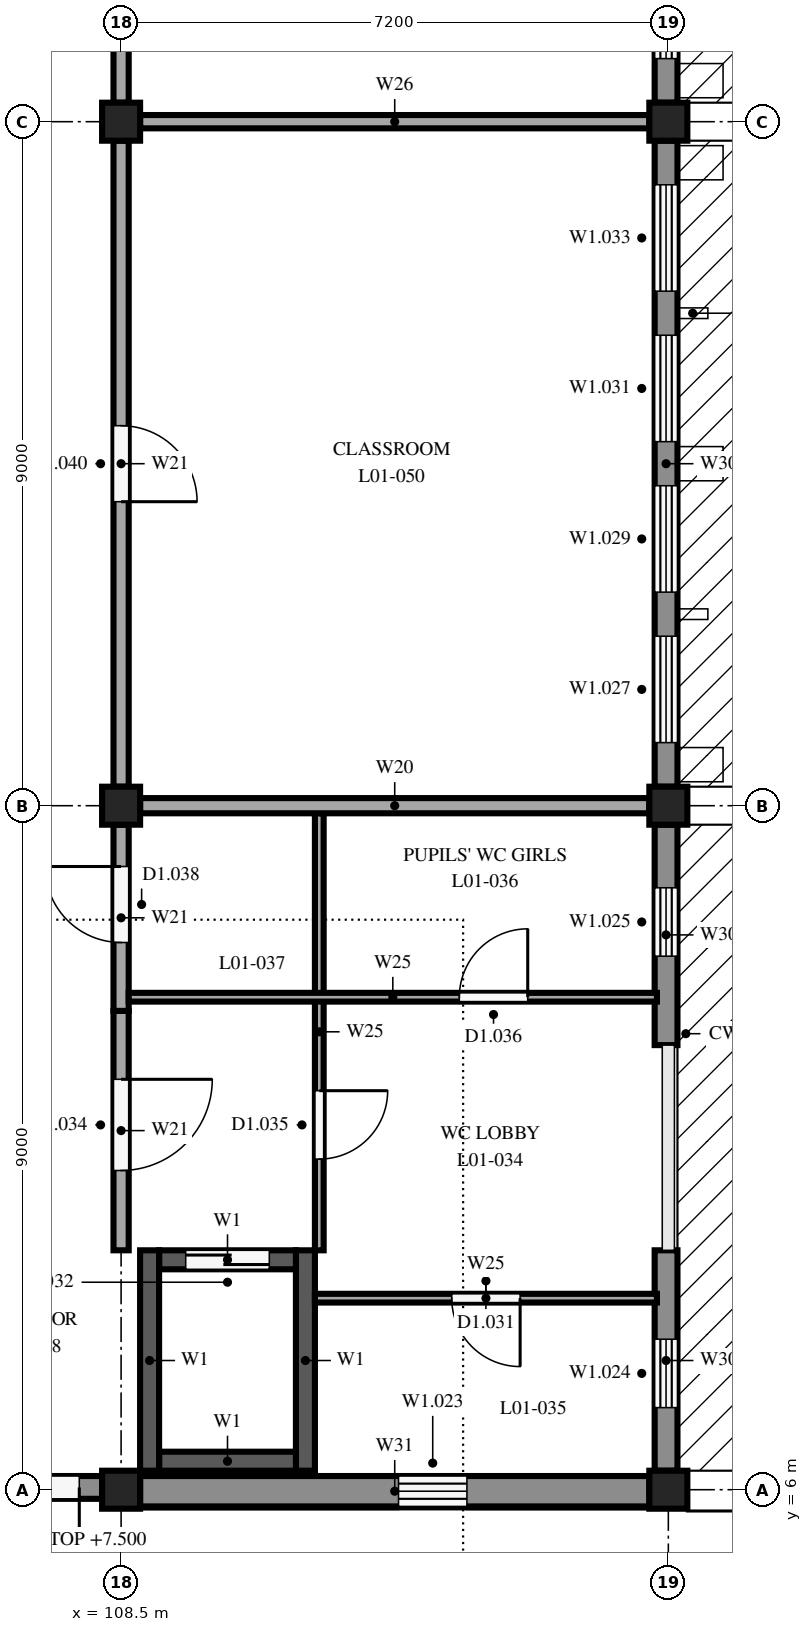
"""IFC4 building model, lengths in metres.
Left out: names, types, materials, properties, quantities, classifications, styles, units other than length and angle.
Written with IfcOpenShell. Run it as: python <this file> out.ifc"""

import sys

from ifc_helpers import new_model, si_unit, direction, frame, frame_2d, origin, origin_2d, place, context, subcontext, project, spatial, rectangle, extrude, element, fill, save


model = new_model("IFC4")
c1 = context("Model", 3, precision=1e-05, world=origin(), true_north=direction((0.0, 1.0)))
c2 = subcontext(c1, "Body", "Model", "MODEL_VIEW")
j1 = project(units=[si_unit("LENGTHUNIT", "METRE"), si_unit("PLANEANGLEUNIT", "RADIAN")], contexts=[c1])
p1 = place(None, origin())
s1 = spatial("IfcSite", under=j1, at=p1, CompositionType="ELEMENT")
p2 = place(p1, origin())
s2 = spatial("IfcBuilding", under=s1, at=p2, CompositionType="ELEMENT")
p3 = place(p2, frame((0.0, 0.0, 4.5)))
s3 = spatial("IfcBuildingStorey", under=s2, at=p3, CompositionType="ELEMENT", Elevation=4.5)
for number, where, z_axis, x_axis in (
    (1, (108.5, 6.0, 0.0), (0.0, 0.0, 1.0), (1.0, 0.0, 0.0)),
    (2, (108.5, 15.0, 0.0), (0.0, 0.0, 1.0), (1.0, 0.0, 0.0)),
    (3, (108.5, 24.0, 0.0), (0.0, 0.0, 1.0), (1.0, 0.0, 0.0)),
    (4, (115.7, 6.0, 0.0), (0.0, 0.0, 1.0), (1.0, 0.0, 0.0)),
    (5, (115.7, 15.0, 0.0), (0.0, 0.0, 1.0), (1.0, 0.0, 0.0)),
    (6, (115.7, 24.0, 0.0), (0.0, 0.0, 1.0), (1.0, 0.0, 0.0)),
):
    element("IfcColumn", number, at=place(p3, frame(where, z_axis=z_axis, x_axis=x_axis)), inside=s3, PredefinedType="COLUMN", context=c2, shape_type="SweptSolid", body=[
        extrude(rectangle(XDim=0.5, YDim=0.5, at=origin_2d()), origin(), (0.0, 0.0, 1.0), 3.35),
    ])
for number, where, z_axis, x_axis in (
    (7, (108.875, 6.25, 0.0), (0.0, 0.0, 1.0), (0.0, 1.0, 0.0)),
    (8, (110.925, 6.25, 0.0), (0.0, 0.0, 1.0), (0.0, 1.0, 0.0)),
):
    element("IfcWall", number, at=place(p3, frame(where, z_axis=z_axis, x_axis=x_axis)), inside=s3, PredefinedType="SHEAR", context=c2, shape_type="SweptSolid", body=[
        extrude(rectangle(XDim=2.9, YDim=0.25, at=frame_2d((1.45, 0.0))), origin(), (0.0, 0.0, 1.0), 3.35),
    ])
p4 = place(p3, frame((109.0, 6.375, 0.0), z_axis=(0.0, 0.0, 1.0), x_axis=(1.0, 0.0, 0.0)))
e9 = element("IfcWall", 9, at=p4, inside=s3, PredefinedType="SHEAR", context=c2, shape_type="SweptSolid", body=[
    extrude(rectangle(XDim=1.8, YDim=0.25, at=frame_2d((0.9, 0.0))), origin(), (0.0, 0.0, 1.0), 3.35),
])
p5 = place(p3, frame((109.0, 9.025, 0.0), z_axis=(0.0, 0.0, 1.0), x_axis=(1.0, 0.0, 0.0)))
e10 = element("IfcWall", 10, at=p5, inside=s3, PredefinedType="SHEAR", context=c2, shape_type="SweptSolid", body=[
    extrude(rectangle(XDim=1.8, YDim=0.25, at=frame_2d((0.9, 0.0))), origin(), (0.0, 0.0, 1.0), 3.35),
])
p6 = place(p5, frame((0.35, 0.0, 0.0)))
e11 = element("IfcOpeningElement", 11, at=p6, cuts=e10, PredefinedType="OPENING", context=c2, shape_type="SweptSolid", body=[
    extrude(rectangle(XDim=1.1, YDim=2.1, at=frame_2d((0.55, 1.05))), frame((0.0, 0.135, 0.0), z_axis=(0.0, -1.0, 0.0), x_axis=(1.0, 0.0, 0.0)), (0.0, 0.0, 1.0), 0.27),
])
p7 = place(p3, frame((115.67, 9.15, 0.0), z_axis=(0.0, 0.0, 1.0), x_axis=(0.0, -1.0, 0.0)))
e12 = element("IfcWall", 12, at=p7, inside=s3, PredefinedType="STANDARD", context=c2, shape_type="SweptSolid", body=[
    extrude(rectangle(XDim=2.9, YDim=0.3, at=frame_2d((1.45, 0.0))), origin(), (0.0, 0.0, 1.0), 2.85),
])
p8 = place(p7, frame((1.17, 0.0, 1.6)))
e13 = element("IfcOpeningElement", 13, at=p8, cuts=e12, PredefinedType="OPENING", context=c2, shape_type="SweptSolid", body=[
    extrude(rectangle(XDim=0.9, YDim=1.0, at=frame_2d((0.45, 0.5))), frame((0.0, 0.16, 0.0), z_axis=(0.0, -1.0, 0.0), x_axis=(1.0, 0.0, 0.0)), (0.0, 0.0, 1.0), 0.32),
])
p9 = place(p3, frame((115.67, 14.75, 0.0), z_axis=(0.0, 0.0, 1.0), x_axis=(0.0, -1.0, 0.0)))
e14 = element("IfcWall", 14, at=p9, inside=s3, PredefinedType="STANDARD", context=c2, shape_type="SweptSolid", body=[
    extrude(rectangle(XDim=2.9, YDim=0.3, at=frame_2d((1.45, 0.0))), origin(), (0.0, 0.0, 1.0), 2.85),
])
p10 = place(p9, frame((0.83, 0.0, 1.6)))
e15 = element("IfcOpeningElement", 15, at=p10, cuts=e14, PredefinedType="OPENING", context=c2, shape_type="SweptSolid", body=[
    extrude(rectangle(XDim=0.9, YDim=1.0, at=frame_2d((0.45, 0.5))), frame((0.0, 0.16, 0.0), z_axis=(0.0, -1.0, 0.0), x_axis=(1.0, 0.0, 0.0)), (0.0, 0.0, 1.0), 0.32),
])
p11 = place(p3, frame((115.67, 23.75, 0.0), z_axis=(0.0, 0.0, 1.0), x_axis=(0.0, -1.0, 0.0)))
e16 = element("IfcWall", 16, at=p11, inside=s3, PredefinedType="STANDARD", context=c2, shape_type="SweptSolid", body=[
    extrude(rectangle(XDim=8.5, YDim=0.3, at=frame_2d((4.25, 0.0))), origin(), (0.0, 0.0, 1.0), 2.85),
])
p12 = place(p11, frame((6.52, 0.0, 0.6)))
e17 = element("IfcOpeningElement", 17, at=p12, cuts=e16, PredefinedType="OPENING", context=c2, shape_type="SweptSolid", body=[
    extrude(rectangle(XDim=1.4, YDim=2.2, at=frame_2d((0.7, 1.1))), frame((0.0, 0.16, 0.0), z_axis=(0.0, -1.0, 0.0), x_axis=(1.0, 0.0, 0.0)), (0.0, 0.0, 1.0), 0.32),
])
p13 = place(p11, frame((4.54, 0.0, 0.6)))
e18 = element("IfcOpeningElement", 18, at=p13, cuts=e16, PredefinedType="OPENING", context=c2, shape_type="SweptSolid", body=[
    extrude(rectangle(XDim=1.4, YDim=2.2, at=frame_2d((0.7, 1.1))), frame((0.0, 0.16, 0.0), z_axis=(0.0, -1.0, 0.0), x_axis=(1.0, 0.0, 0.0)), (0.0, 0.0, 1.0), 0.32),
])
p14 = place(p11, frame((2.56, 0.0, 0.6)))
e19 = element("IfcOpeningElement", 19, at=p14, cuts=e16, PredefinedType="OPENING", context=c2, shape_type="SweptSolid", body=[
    extrude(rectangle(XDim=1.4, YDim=2.2, at=frame_2d((0.7, 1.1))), frame((0.0, 0.16, 0.0), z_axis=(0.0, -1.0, 0.0), x_axis=(1.0, 0.0, 0.0)), (0.0, 0.0, 1.0), 0.32),
])
p15 = place(p11, frame((0.58, 0.0, 0.6)))
e20 = element("IfcOpeningElement", 20, at=p15, cuts=e16, PredefinedType="OPENING", context=c2, shape_type="SweptSolid", body=[
    extrude(rectangle(XDim=1.4, YDim=2.2, at=frame_2d((0.7, 1.1))), frame((0.0, 0.16, 0.0), z_axis=(0.0, -1.0, 0.0), x_axis=(1.0, 0.0, 0.0)), (0.0, 0.0, 1.0), 0.32),
])
p16 = place(p3, frame((115.67, 32.75, 0.0), z_axis=(0.0, 0.0, 1.0), x_axis=(0.0, -1.0, 0.0)))
e21 = element("IfcWall", 21, at=p16, inside=s3, PredefinedType="STANDARD", context=c2, shape_type="SweptSolid", body=[
    extrude(rectangle(XDim=8.5, YDim=0.3, at=frame_2d((4.25, 0.0))), origin(), (0.0, 0.0, 1.0), 2.85),
])
p17 = place(p16, frame((6.52, 0.0, 0.6)))
e22 = element("IfcOpeningElement", 22, at=p17, cuts=e21, PredefinedType="OPENING", context=c2, shape_type="SweptSolid", body=[
    extrude(rectangle(XDim=1.4, YDim=2.2, at=frame_2d((0.7, 1.1))), frame((0.0, 0.16, 0.0), z_axis=(0.0, -1.0, 0.0), x_axis=(1.0, 0.0, 0.0)), (0.0, 0.0, 1.0), 0.32),
])
p18 = place(p16, frame((4.54, 0.0, 0.6)))
e23 = element("IfcOpeningElement", 23, at=p18, cuts=e21, PredefinedType="OPENING", context=c2, shape_type="SweptSolid", body=[
    extrude(rectangle(XDim=1.4, YDim=2.2, at=frame_2d((0.7, 1.1))), frame((0.0, 0.16, 0.0), z_axis=(0.0, -1.0, 0.0), x_axis=(1.0, 0.0, 0.0)), (0.0, 0.0, 1.0), 0.32),
])
p19 = place(p16, frame((2.56, 0.0, 0.6)))
e24 = element("IfcOpeningElement", 24, at=p19, cuts=e21, PredefinedType="OPENING", context=c2, shape_type="SweptSolid", body=[
    extrude(rectangle(XDim=1.4, YDim=2.2, at=frame_2d((0.7, 1.1))), frame((0.0, 0.16, 0.0), z_axis=(0.0, -1.0, 0.0), x_axis=(1.0, 0.0, 0.0)), (0.0, 0.0, 1.0), 0.32),
])
p20 = place(p16, frame((0.58, 0.0, 0.6)))
e25 = element("IfcOpeningElement", 25, at=p20, cuts=e21, PredefinedType="OPENING", context=c2, shape_type="SweptSolid", body=[
    extrude(rectangle(XDim=1.4, YDim=2.2, at=frame_2d((0.7, 1.1))), frame((0.0, 0.16, 0.0), z_axis=(0.0, -1.0, 0.0), x_axis=(1.0, 0.0, 0.0)), (0.0, 0.0, 1.0), 0.32),
])
p21 = place(p3, frame((108.25, 6.03, 0.0), z_axis=(0.0, 0.0, 1.0), x_axis=(-1.0, 0.0, 0.0)))
e26 = element("IfcWall", 26, at=p21, inside=s3, PredefinedType="STANDARD", context=c2, shape_type="SweptSolid", body=[
    extrude(rectangle(XDim=2.2, YDim=0.3, at=frame_2d((1.1, 0.0))), origin(), (0.0, 0.0, 1.0), 3.0),
])
p22 = place(p21, frame((0.3, 0.0, 0.0)))
e27 = element("IfcOpeningElement", 27, at=p22, cuts=e26, PredefinedType="OPENING", context=c2, shape_type="SweptSolid", body=[
    extrude(rectangle(XDim=1.6, YDim=2.4, at=frame_2d((0.8, 1.2))), frame((0.0, 0.16, 0.0), z_axis=(0.0, -1.0, 0.0), x_axis=(1.0, 0.0, 0.0)), (0.0, 0.0, 1.0), 0.32),
])
p23 = place(p3, frame((115.45, 5.98, 0.0), z_axis=(0.0, 0.0, 1.0), x_axis=(-1.0, 0.0, 0.0)))
e28 = element("IfcWall", 28, at=p23, inside=s3, PredefinedType="STANDARD", context=c2, shape_type="SweptSolid", body=[
    extrude(rectangle(XDim=6.7, YDim=0.4, at=frame_2d((3.35, 0.0))), origin(), (0.0, 0.0, 1.0), 2.9),
])
p24 = place(p23, frame((2.4, 0.0, 1.6)))
e29 = element("IfcOpeningElement", 29, at=p24, cuts=e28, PredefinedType="OPENING", context=c2, shape_type="SweptSolid", body=[
    extrude(rectangle(XDim=0.9, YDim=1.0, at=frame_2d((0.45, 0.5))), frame((0.0, 0.21, 0.0), z_axis=(0.0, -1.0, 0.0), x_axis=(1.0, 0.0, 0.0)), (0.0, 0.0, 1.0), 0.42),
])
p25 = place(p3, frame((108.5, 12.3, 0.0), z_axis=(0.0, 0.0, 1.0), x_axis=(0.0, -1.0, 0.0)))
e30 = element("IfcWall", 30, at=p25, inside=s3, PredefinedType="PARTITIONING", context=c2, shape_type="SweptSolid", body=[
    extrude(rectangle(XDim=3.15, YDim=0.2, at=frame_2d((1.575, 0.0))), origin(), (0.0, 0.0, 1.0), 2.9),
])
p26 = place(p25, frame((0.9, 0.0, 0.0)))
e31 = element("IfcOpeningElement", 31, at=p26, cuts=e30, PredefinedType="OPENING", context=c2, shape_type="SweptSolid", body=[
    extrude(rectangle(XDim=1.2, YDim=2.1, at=frame_2d((0.6, 1.05))), frame((0.0, 0.11, 0.0), z_axis=(0.0, -1.0, 0.0), x_axis=(1.0, 0.0, 0.0)), (0.0, 0.0, 1.0), 0.22),
])
p27 = place(p3, frame((108.5, 12.3, 0.0), z_axis=(0.0, 0.0, 1.0), x_axis=(0.0, 1.0, 0.0)))
e32 = element("IfcWall", 32, at=p27, inside=s3, PredefinedType="PARTITIONING", context=c2, shape_type="SweptSolid", body=[
    extrude(rectangle(XDim=2.45, YDim=0.2, at=frame_2d((1.225, 0.0))), origin(), (0.0, 0.0, 1.0), 2.9),
])
p28 = place(p27, frame((0.9, 0.0, 0.0)))
e33 = element("IfcOpeningElement", 33, at=p28, cuts=e32, PredefinedType="OPENING", context=c2, shape_type="SweptSolid", body=[
    extrude(rectangle(XDim=1.0, YDim=2.1, at=frame_2d((0.5, 1.05))), frame((0.0, 0.11, 0.0), z_axis=(0.0, -1.0, 0.0), x_axis=(1.0, 0.0, 0.0)), (0.0, 0.0, 1.0), 0.22),
])
p29 = place(p3, frame((108.75, 15.0, 0.0), z_axis=(0.0, 0.0, 1.0), x_axis=(1.0, 0.0, 0.0)))
e34 = element("IfcWall", 34, at=p29, inside=s3, PredefinedType="PARTITIONING", context=c2, shape_type="SweptSolid", body=[
    extrude(rectangle(XDim=6.7, YDim=0.2, at=frame_2d((3.35, 0.0))), origin(), (0.0, 0.0, 1.0), 2.9),
])
p30 = place(p3, frame((111.107, 14.9, 0.0), z_axis=(0.0, 0.0, 1.0), x_axis=(0.0, -1.0, 0.0)))
e35 = element("IfcWall", 35, at=p30, inside=s3, PredefinedType="PARTITIONING", context=c2, shape_type="SweptSolid", body=[
    extrude(rectangle(XDim=5.75, YDim=0.115, at=frame_2d((2.875, 0.0))), origin(), (0.0, 0.0, 1.0), 3.35),
])
p31 = place(p30, frame((3.65, 0.0, 0.0)))
e36 = element("IfcOpeningElement", 36, at=p31, cuts=e35, PredefinedType="OPENING", context=c2, shape_type="SweptSolid", body=[
    extrude(rectangle(XDim=0.9, YDim=2.1, at=frame_2d((0.45, 1.05))), frame((0.0, 0.067, 0.0), z_axis=(0.0, -1.0, 0.0), x_axis=(1.0, 0.0, 0.0)), (0.0, 0.0, 1.0), 0.135),
])
p32 = place(p3, frame((115.55, 8.52, 0.0), z_axis=(0.0, 0.0, 1.0), x_axis=(-1.0, 0.0, 0.0)))
e37 = element("IfcWall", 37, at=p32, inside=s3, PredefinedType="PARTITIONING", context=c2, shape_type="SweptSolid", body=[
    extrude(rectangle(XDim=4.5, YDim=0.115, at=frame_2d((2.25, 0.0))), origin(), (0.0, 0.0, 1.0), 3.35),
])
p33 = place(p32, frame((1.8, 0.0, 0.0)))
e38 = element("IfcOpeningElement", 38, at=p33, cuts=e37, PredefinedType="OPENING", context=c2, shape_type="SweptSolid", body=[
    extrude(rectangle(XDim=0.9, YDim=2.1, at=frame_2d((0.45, 1.05))), frame((0.0, 0.067, 0.0), z_axis=(0.0, -1.0, 0.0), x_axis=(1.0, 0.0, 0.0)), (0.0, 0.0, 1.0), 0.135),
])
p34 = place(p3, frame((108.6, 12.48, 0.0), z_axis=(0.0, 0.0, 1.0), x_axis=(1.0, 0.0, 0.0)))
e39 = element("IfcWall", 39, at=p34, inside=s3, PredefinedType="PARTITIONING", context=c2, shape_type="SweptSolid", body=[
    extrude(rectangle(XDim=6.95, YDim=0.115, at=frame_2d((3.475, 0.0))), origin(), (0.0, 0.0, 1.0), 3.35),
])
p35 = place(p34, frame((4.35, 0.0, 0.0)))
e40 = element("IfcOpeningElement", 40, at=p35, cuts=e39, PredefinedType="OPENING", context=c2, shape_type="SweptSolid", body=[
    extrude(rectangle(XDim=0.9, YDim=2.1, at=frame_2d((0.45, 1.05))), frame((0.0, 0.067, 0.0), z_axis=(0.0, -1.0, 0.0), x_axis=(1.0, 0.0, 0.0)), (0.0, 0.0, 1.0), 0.135),
])
p36 = place(p3, frame((108.5, 23.75, 0.0), z_axis=(0.0, 0.0, 1.0), x_axis=(0.0, -1.0, 0.0)))
e41 = element("IfcWall", 41, at=p36, inside=s3, PredefinedType="PARTITIONING", context=c2, shape_type="SweptSolid", body=[
    extrude(rectangle(XDim=8.5, YDim=0.2, at=frame_2d((4.25, 0.0))), origin(), (0.0, 0.0, 1.0), 2.9),
])
p37 = place(p36, frame((3.75, 0.0, 0.0)))
e42 = element("IfcOpeningElement", 42, at=p37, cuts=e41, PredefinedType="OPENING", context=c2, shape_type="SweptSolid", body=[
    extrude(rectangle(XDim=1.0, YDim=2.1, at=frame_2d((0.5, 1.05))), frame((0.0, 0.11, 0.0), z_axis=(0.0, -1.0, 0.0), x_axis=(1.0, 0.0, 0.0)), (0.0, 0.0, 1.0), 0.22),
])
p38 = place(p3, frame((108.5, 32.75, 0.0), z_axis=(0.0, 0.0, 1.0), x_axis=(0.0, -1.0, 0.0)))
e43 = element("IfcWall", 43, at=p38, inside=s3, PredefinedType="PARTITIONING", context=c2, shape_type="SweptSolid", body=[
    extrude(rectangle(XDim=8.5, YDim=0.2, at=frame_2d((4.25, 0.0))), origin(), (0.0, 0.0, 1.0), 2.9),
])
p39 = place(p38, frame((5.919, 0.0, 0.0)))
e44 = element("IfcOpeningElement", 44, at=p39, cuts=e43, PredefinedType="OPENING", context=c2, shape_type="SweptSolid", body=[
    extrude(rectangle(XDim=1.0, YDim=2.1, at=frame_2d((0.5, 1.05))), frame((0.0, 0.11, 0.0), z_axis=(0.0, -1.0, 0.0), x_axis=(1.0, 0.0, 0.0)), (0.0, 0.0, 1.0), 0.22),
])
p40 = place(p38, frame((1.581, 0.0, 0.0)))
e45 = element("IfcOpeningElement", 45, at=p40, cuts=e43, PredefinedType="OPENING", context=c2, shape_type="SweptSolid", body=[
    extrude(rectangle(XDim=1.0, YDim=2.1, at=frame_2d((0.5, 1.05))), frame((0.0, 0.11, 0.0), z_axis=(0.0, -1.0, 0.0), x_axis=(1.0, 0.0, 0.0)), (0.0, 0.0, 1.0), 0.22),
])
p41 = place(p3, frame((108.75, 24.0, 0.0), z_axis=(0.0, 0.0, 1.0), x_axis=(1.0, 0.0, 0.0)))
e46 = element("IfcWall", 46, at=p41, inside=s3, PredefinedType="PARTITIONING", context=c2, shape_type="SweptSolid", body=[
    extrude(rectangle(XDim=6.7, YDim=0.175, at=frame_2d((3.35, 0.0))), origin(), (0.0, 0.0, 1.0), 2.9),
])
p42 = place(p8, origin())
e47 = element("IfcWindow", 47, at=p42, inside=s3, PartitioningType="SINGLE_PANEL", PredefinedType="WINDOW", context=c2, shape_type="SweptSolid", body=[
    extrude(rectangle(XDim=0.9, YDim=1.0, at=frame_2d((0.45, 0.5))), frame((0.0, 0.03, 0.0), z_axis=(0.0, -1.0, 0.0), x_axis=(1.0, 0.0, 0.0)), (0.0, 0.0, 1.0), 0.06),
])
fill(e13, e47)
p43 = place(p10, origin())
e48 = element("IfcWindow", 48, at=p43, inside=s3, PartitioningType="SINGLE_PANEL", PredefinedType="WINDOW", context=c2, shape_type="SweptSolid", body=[
    extrude(rectangle(XDim=0.9, YDim=1.0, at=frame_2d((0.45, 0.5))), frame((0.0, 0.03, 0.0), z_axis=(0.0, -1.0, 0.0), x_axis=(1.0, 0.0, 0.0)), (0.0, 0.0, 1.0), 0.06),
])
fill(e15, e48)
p44 = place(p12, origin())
e49 = element("IfcWindow", 49, at=p44, inside=s3, PartitioningType="DOUBLE_PANEL_VERTICAL", PredefinedType="WINDOW", context=c2, shape_type="SweptSolid", body=[
    extrude(rectangle(XDim=1.4, YDim=2.2, at=frame_2d((0.7, 1.1))), frame((0.0, 0.03, 0.0), z_axis=(0.0, -1.0, 0.0), x_axis=(1.0, 0.0, 0.0)), (0.0, 0.0, 1.0), 0.06),
])
fill(e17, e49)
p45 = place(p13, origin())
e50 = element("IfcWindow", 50, at=p45, inside=s3, PartitioningType="DOUBLE_PANEL_VERTICAL", PredefinedType="WINDOW", context=c2, shape_type="SweptSolid", body=[
    extrude(rectangle(XDim=1.4, YDim=2.2, at=frame_2d((0.7, 1.1))), frame((0.0, 0.03, 0.0), z_axis=(0.0, -1.0, 0.0), x_axis=(1.0, 0.0, 0.0)), (0.0, 0.0, 1.0), 0.06),
])
fill(e18, e50)
p46 = place(p14, origin())
e51 = element("IfcWindow", 51, at=p46, inside=s3, PartitioningType="DOUBLE_PANEL_VERTICAL", PredefinedType="WINDOW", context=c2, shape_type="SweptSolid", body=[
    extrude(rectangle(XDim=1.4, YDim=2.2, at=frame_2d((0.7, 1.1))), frame((0.0, 0.03, 0.0), z_axis=(0.0, -1.0, 0.0), x_axis=(1.0, 0.0, 0.0)), (0.0, 0.0, 1.0), 0.06),
])
fill(e19, e51)
p47 = place(p15, origin())
e52 = element("IfcWindow", 52, at=p47, inside=s3, PartitioningType="DOUBLE_PANEL_VERTICAL", PredefinedType="WINDOW", context=c2, shape_type="SweptSolid", body=[
    extrude(rectangle(XDim=1.4, YDim=2.2, at=frame_2d((0.7, 1.1))), frame((0.0, 0.03, 0.0), z_axis=(0.0, -1.0, 0.0), x_axis=(1.0, 0.0, 0.0)), (0.0, 0.0, 1.0), 0.06),
])
fill(e20, e52)
p48 = place(p17, origin())
e53 = element("IfcWindow", 53, at=p48, inside=s3, PartitioningType="DOUBLE_PANEL_VERTICAL", PredefinedType="WINDOW", context=c2, shape_type="SweptSolid", body=[
    extrude(rectangle(XDim=1.4, YDim=2.2, at=frame_2d((0.7, 1.1))), frame((0.0, 0.03, 0.0), z_axis=(0.0, -1.0, 0.0), x_axis=(1.0, 0.0, 0.0)), (0.0, 0.0, 1.0), 0.06),
])
fill(e22, e53)
p49 = place(p22, origin())
e54 = element("IfcDoor", 54, at=p49, inside=s3, OperationType="DOUBLE_DOOR_SINGLE_SWING", PredefinedType="DOOR", context=c2, shape_type="SweptSolid", body=[
    extrude(rectangle(XDim=1.6, YDim=2.4, at=frame_2d((0.8, 1.2))), frame((0.0, 0.025, 0.0), z_axis=(0.0, -1.0, 0.0), x_axis=(1.0, 0.0, 0.0)), (0.0, 0.0, 1.0), 0.05),
])
fill(e27, e54)
p50 = place(p24, origin())
e55 = element("IfcWindow", 55, at=p50, inside=s3, PartitioningType="SINGLE_PANEL", PredefinedType="WINDOW", context=c2, shape_type="SweptSolid", body=[
    extrude(rectangle(XDim=0.9, YDim=1.0, at=frame_2d((0.45, 0.5))), frame((0.0, 0.03, 0.0), z_axis=(0.0, -1.0, 0.0), x_axis=(1.0, 0.0, 0.0)), (0.0, 0.0, 1.0), 0.06),
])
fill(e29, e55)
p51 = place(p26, origin())
e56 = element("IfcDoor", 56, at=p51, inside=s3, OperationType="SINGLE_SWING_LEFT", PredefinedType="DOOR", context=c2, shape_type="SweptSolid", body=[
    extrude(rectangle(XDim=1.2, YDim=2.1, at=frame_2d((0.6, 1.05))), frame((0.0, 0.025, 0.0), z_axis=(0.0, -1.0, 0.0), x_axis=(1.0, 0.0, 0.0)), (0.0, 0.0, 1.0), 0.05),
])
fill(e31, e56)
p52 = place(p28, origin())
e57 = element("IfcDoor", 57, at=p52, inside=s3, OperationType="SINGLE_SWING_RIGHT", PredefinedType="DOOR", context=c2, shape_type="SweptSolid", body=[
    extrude(rectangle(XDim=1.0, YDim=2.1, at=frame_2d((0.5, 1.05))), frame((0.0, 0.025, 0.0), z_axis=(0.0, -1.0, 0.0), x_axis=(1.0, 0.0, 0.0)), (0.0, 0.0, 1.0), 0.05),
])
fill(e33, e57)
p53 = place(p31, origin())
e58 = element("IfcDoor", 58, at=p53, inside=s3, OperationType="SINGLE_SWING_LEFT", PredefinedType="DOOR", context=c2, shape_type="SweptSolid", body=[
    extrude(rectangle(XDim=0.9, YDim=2.1, at=frame_2d((0.45, 1.05))), frame((0.0, 0.025, 0.0), z_axis=(0.0, -1.0, 0.0), x_axis=(1.0, 0.0, 0.0)), (0.0, 0.0, 1.0), 0.05),
])
fill(e36, e58)
p54 = place(p33, origin())
e59 = element("IfcDoor", 59, at=p54, inside=s3, OperationType="SINGLE_SWING_LEFT", PredefinedType="DOOR", context=c2, shape_type="SweptSolid", body=[
    extrude(rectangle(XDim=0.9, YDim=2.1, at=frame_2d((0.45, 1.05))), frame((0.0, 0.025, 0.0), z_axis=(0.0, -1.0, 0.0), x_axis=(1.0, 0.0, 0.0)), (0.0, 0.0, 1.0), 0.05),
])
fill(e38, e59)
p55 = place(p35, origin())
e60 = element("IfcDoor", 60, at=p55, inside=s3, OperationType="SINGLE_SWING_RIGHT", PredefinedType="DOOR", context=c2, shape_type="SweptSolid", body=[
    extrude(rectangle(XDim=0.9, YDim=2.1, at=frame_2d((0.45, 1.05))), frame((0.0, 0.025, 0.0), z_axis=(0.0, -1.0, 0.0), x_axis=(1.0, 0.0, 0.0)), (0.0, 0.0, 1.0), 0.05),
])
fill(e40, e60)
p56 = place(p37, origin())
e61 = element("IfcDoor", 61, at=p56, inside=s3, OperationType="SINGLE_SWING_RIGHT", PredefinedType="DOOR", context=c2, shape_type="SweptSolid", body=[
    extrude(rectangle(XDim=1.0, YDim=2.1, at=frame_2d((0.5, 1.05))), frame((0.0, 0.025, 0.0), z_axis=(0.0, -1.0, 0.0), x_axis=(1.0, 0.0, 0.0)), (0.0, 0.0, 1.0), 0.05),
])
fill(e42, e61)
p57 = place(p6, origin())
e62 = element("IfcDoor", 62, at=p57, inside=s3, OperationType="SLIDING_TO_LEFT", PredefinedType="DOOR", context=c2, shape_type="SweptSolid", body=[
    extrude(rectangle(XDim=1.1, YDim=2.1, at=frame_2d((0.55, 1.05))), frame((0.0, 0.025, 0.0), z_axis=(0.0, -1.0, 0.0), x_axis=(1.0, 0.0, 0.0)), (0.0, 0.0, 1.0), 0.05),
])
fill(e11, e62)
save(model, sys.argv[1])
